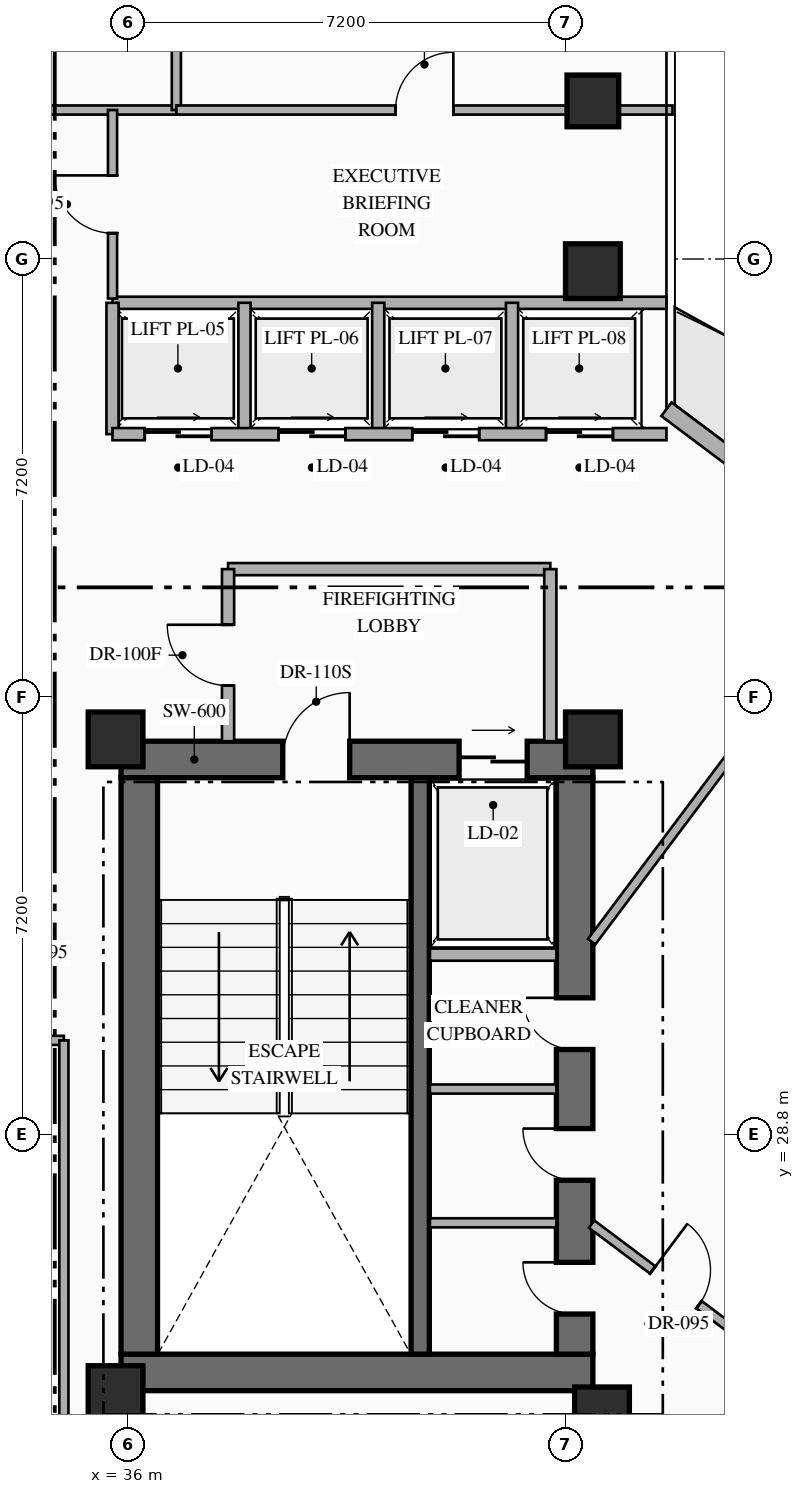
"""IFC4 building model, lengths in metres.
Left out: names, types, materials, properties, quantities, classifications, styles, units other than length and angle.
Written with IfcOpenShell. Run it as: python <this file> out.ifc"""

import sys

from ifc_helpers import new_model, si_unit, direction, frame, frame_2d, origin, origin_2d, place, context, subcontext, project, spatial, rectangle, hollow_rectangle, extrude, element, fill, save


model = new_model("IFC4")
c1 = context("Model", 3, precision=1e-05, world=origin(), true_north=direction((0.0, 1.0)))
c2 = subcontext(c1, "Body", "Model", "MODEL_VIEW")
j1 = project(units=[si_unit("LENGTHUNIT", "METRE"), si_unit("PLANEANGLEUNIT", "RADIAN")], contexts=[c1])
p1 = place(None, origin())
s1 = spatial("IfcSite", under=j1, at=p1, CompositionType="ELEMENT")
p2 = place(p1, origin())
s2 = spatial("IfcBuilding", under=s1, at=p2, CompositionType="ELEMENT")
p3 = place(p2, frame((0.0, 0.0, 160.05)))
s3 = spatial("IfcBuildingStorey", under=s2, at=p3, CompositionType="ELEMENT", Elevation=160.05)
p4 = place(p3, frame((35.89, 24.89, 0.0), z_axis=(0.0, 0.0, 1.0), x_axis=(1.0, 0.0, 0.0)))
e1 = element("IfcWall", 1, at=p4, inside=s3, PredefinedType="SHEAR", context=c2, shape_type="SweptSolid", body=[
    extrude(rectangle(XDim=7.76, YDim=0.6, at=frame_2d((3.88, 0.0))), origin(), (0.0, 0.0, 1.0), 3.6),
])
p5 = place(p3, frame((35.89, 34.97, 0.0), z_axis=(0.0, 0.0, 1.0), x_axis=(1.0, 0.0, 0.0)))
e2 = element("IfcWall", 2, at=p5, inside=s3, PredefinedType="SHEAR", context=c2, shape_type="SweptSolid", body=[
    extrude(rectangle(XDim=7.76, YDim=0.6, at=frame_2d((3.88, 0.0))), origin(), (0.0, 0.0, 1.0), 3.6),
])
p6 = place(p5, frame((2.66, 0.0, 0.0)))
e3 = element("IfcOpeningElement", 3, at=p6, cuts=e2, PredefinedType="OPENING", context=c2, shape_type="SweptSolid", body=[
    extrude(rectangle(XDim=1.1, YDim=2.2, at=frame_2d((0.55, 1.1))), frame((0.0, 0.31, 0.0), z_axis=(0.0, -1.0, 0.0), x_axis=(1.0, 0.0, 0.0)), (0.0, 0.0, 1.0), 0.62),
])
p7 = place(p5, frame((5.56, 0.0, 0.0)))
e4 = element("IfcOpeningElement", 4, at=p7, cuts=e2, PredefinedType="OPENING", context=c2, shape_type="SweptSolid", body=[
    extrude(rectangle(XDim=1.12, YDim=2.15, at=frame_2d((0.56, 1.075))), frame((0.0, 0.31, 0.0), z_axis=(0.0, -1.0, 0.0), x_axis=(1.0, 0.0, 0.0)), (0.0, 0.0, 1.0), 0.62),
])
p8 = place(p3, frame((36.19, 25.19, 0.0), z_axis=(0.0, 0.0, 1.0), x_axis=(0.0, 1.0, 0.0)))
e5 = element("IfcWall", 5, at=p8, inside=s3, PredefinedType="SHEAR", context=c2, shape_type="SweptSolid", body=[
    extrude(rectangle(XDim=9.48, YDim=0.6, at=frame_2d((4.74, 0.0))), origin(), (0.0, 0.0, 1.0), 3.6),
])
p9 = place(p3, frame((43.35, 25.19, 0.0), z_axis=(0.0, 0.0, 1.0), x_axis=(0.0, 1.0, 0.0)))
e6 = element("IfcWall", 6, at=p9, inside=s3, PredefinedType="SHEAR", context=c2, shape_type="SweptSolid", body=[
    extrude(rectangle(XDim=9.48, YDim=0.6, at=frame_2d((4.74, 0.0))), origin(), (0.0, 0.0, 1.0), 3.6),
])
p10 = place(p9, frame((0.66, 0.0, 0.0)))
e7 = element("IfcOpeningElement", 7, at=p10, cuts=e6, PredefinedType="OPENING", context=c2, shape_type="SweptSolid", body=[
    extrude(rectangle(XDim=0.85, YDim=2.08, at=frame_2d((0.425, 1.04))), frame((0.0, 0.31, 0.0), z_axis=(0.0, -1.0, 0.0), x_axis=(1.0, 0.0, 0.0)), (0.0, 0.0, 1.0), 0.62),
])
p11 = place(p9, frame((2.86, 0.0, 0.0)))
e8 = element("IfcOpeningElement", 8, at=p11, cuts=e6, PredefinedType="OPENING", context=c2, shape_type="SweptSolid", body=[
    extrude(rectangle(XDim=0.85, YDim=2.08, at=frame_2d((0.425, 1.04))), frame((0.0, 0.31, 0.0), z_axis=(0.0, -1.0, 0.0), x_axis=(1.0, 0.0, 0.0)), (0.0, 0.0, 1.0), 0.62),
])
p12 = place(p9, frame((5.01, 0.0, 0.0)))
e9 = element("IfcOpeningElement", 9, at=p12, cuts=e6, PredefinedType="OPENING", context=c2, shape_type="SweptSolid", body=[
    extrude(rectangle(XDim=0.85, YDim=2.08, at=frame_2d((0.425, 1.04))), frame((0.0, 0.31, 0.0), z_axis=(0.0, -1.0, 0.0), x_axis=(1.0, 0.0, 0.0)), (0.0, 0.0, 1.0), 0.62),
])
p13 = place(p3, frame((40.81, 25.19, 0.0), z_axis=(0.0, 0.0, 1.0), x_axis=(0.0, 1.0, 0.0)))
e10 = element("IfcWall", 10, at=p13, inside=s3, PredefinedType="SHEAR", context=c2, shape_type="SweptSolid", body=[
    extrude(rectangle(XDim=9.48, YDim=0.3, at=frame_2d((4.74, 0.0))), origin(), (0.0, 0.0, 1.0), 3.6),
])
for number, where, z_axis, x_axis in (
    (11, (35.8, 24.55, 0.0), (0.0, 0.0, 1.0), (1.0, 0.0, 0.0)),
    (12, (43.8, 24.2, 0.0), (0.0, 0.0, 1.0), (1.0, 0.0, 0.0)),
    (13, (35.8, 35.3, 0.0), (0.0, 0.0, 1.0), (1.0, 0.0, 0.0)),
    (14, (43.65, 35.3, 0.0), (0.0, 0.0, 1.0), (1.0, 0.0, 0.0)),
    (15, (43.65, 43.0, 0.0), (0.0, 0.0, 1.0), (1.0, 0.0, 0.0)),
):
    element("IfcColumn", number, at=place(p3, frame(where, z_axis=z_axis, x_axis=x_axis)), inside=s3, PredefinedType="COLUMN", context=c2, shape_type="SweptSolid", body=[
        extrude(rectangle(XDim=0.9, YDim=0.9, at=origin_2d()), origin(), (0.0, 0.0, 1.0), 3.6),
    ])
p14 = place(p3, frame((43.65, 45.8, 0.0), z_axis=(0.0, 0.0, 1.0), x_axis=(1.0, 0.0, 0.0)))
e16 = element("IfcColumn", 16, at=p14, inside=s3, PredefinedType="COLUMN", context=c2, shape_type="SweptSolid", body=[
    extrude(hollow_rectangle(XDim=0.85, YDim=0.85, WallThickness=0.032, at=origin_2d()), origin(), (0.0, 0.0, 1.0), 3.6),
])
p15 = place(p3, frame((44.86, 40.73, 0.0), z_axis=(0.0, 0.0, 1.0), x_axis=(0.800007624502, -0.599989833863, 0.0)))
e17 = element("IfcWall", 17, at=p15, inside=s3, PredefinedType="STANDARD", context=c2, shape_type="SweptSolid", body=[
    extrude(rectangle(XDim=19.212, YDim=0.28, at=frame_2d((9.606, 0.0))), origin(), (0.0, 0.0, 1.0), 3.35),
])
p16 = place(p15, frame((1.755, 0.0, 0.0)))
e18 = element("IfcOpeningElement", 18, at=p16, cuts=e17, PredefinedType="OPENING", context=c2, shape_type="SweptSolid", body=[
    extrude(rectangle(XDim=1.1, YDim=2.2, at=frame_2d((0.55, 1.1))), frame((0.0, 0.15, 0.0), z_axis=(0.0, -1.0, 0.0), x_axis=(1.0, 0.0, 0.0)), (0.0, 0.0, 1.0), 0.3),
])
p17 = place(p15, frame((13.509, 0.0, 0.85)))
e19 = element("IfcOpeningElement", 19, at=p17, cuts=e17, PredefinedType="OPENING", context=c2, shape_type="SweptSolid", body=[
    extrude(rectangle(XDim=1.8, YDim=2.1, at=frame_2d((0.9, 1.05))), frame((0.0, 0.15, 0.0), z_axis=(0.0, -1.0, 0.0), x_axis=(1.0, 0.0, 0.0)), (0.0, 0.0, 1.0), 0.3),
])
p18 = place(p3, frame((40.97, 31.76, 0.0), z_axis=(0.0, 0.0, 1.0), x_axis=(1.0, 0.0, 0.0)))
e20 = element("IfcWall", 20, at=p18, inside=s3, PredefinedType="STANDARD", context=c2, shape_type="SweptSolid", body=[
    extrude(rectangle(XDim=2.08, YDim=0.2, at=frame_2d((1.04, 0.0))), origin(), (0.0, 0.0, 1.0), 3.35),
])
for number, where, z_axis, x_axis in (
    (21, (40.97, 27.35, 0.0), (0.0, 0.0, 1.0), (1.0, 0.0, 0.0)),
    (22, (40.97, 29.55, 0.0), (0.0, 0.0, 1.0), (1.0, 0.0, 0.0)),
):
    element("IfcWall", number, at=place(p3, frame(where, z_axis=z_axis, x_axis=x_axis)), inside=s3, PredefinedType="PARTITIONING", context=c2, shape_type="SweptSolid", body=[
        extrude(rectangle(XDim=2.08, YDim=0.15, at=frame_2d((1.04, 0.0))), origin(), (0.0, 0.0, 1.0), 3.35),
    ])
p19 = place(p3, frame((37.65, 38.1, 0.0), z_axis=(0.0, 0.0, 1.0), x_axis=(1.0, 0.0, 0.0)))
e23 = element("IfcWall", 23, at=p19, inside=s3, PredefinedType="STANDARD", context=c2, shape_type="SweptSolid", body=[
    extrude(rectangle(XDim=5.3, YDim=0.2, at=frame_2d((2.65, 0.0))), origin(), (0.0, 0.0, 1.0), 3.35),
])
p20 = place(p3, frame((42.95, 35.27, 0.0), z_axis=(0.0, 0.0, 1.0), x_axis=(0.0, 1.0, 0.0)))
e24 = element("IfcWall", 24, at=p20, inside=s3, PredefinedType="STANDARD", context=c2, shape_type="SweptSolid", body=[
    extrude(rectangle(XDim=2.83, YDim=0.2, at=frame_2d((1.415, 0.0))), origin(), (0.0, 0.0, 1.0), 3.35),
])
p21 = place(p3, frame((37.65, 35.27, 0.0), z_axis=(0.0, 0.0, 1.0), x_axis=(0.0, 1.0, 0.0)))
e25 = element("IfcWall", 25, at=p21, inside=s3, PredefinedType="STANDARD", context=c2, shape_type="SweptSolid", body=[
    extrude(rectangle(XDim=2.83, YDim=0.2, at=frame_2d((1.415, 0.0))), origin(), (0.0, 0.0, 1.0), 3.35),
])
p22 = place(p21, frame((0.915, 0.0, 0.0)))
e26 = element("IfcOpeningElement", 26, at=p22, cuts=e25, PredefinedType="OPENING", context=c2, shape_type="SweptSolid", body=[
    extrude(rectangle(XDim=1.0, YDim=2.2, at=frame_2d((0.5, 1.1))), frame((0.0, 0.11, 0.0), z_axis=(0.0, -1.0, 0.0), x_axis=(1.0, 0.0, 0.0)), (0.0, 0.0, 1.0), 0.22),
])
p23 = place(p3, frame((35.75, 42.48, 0.0), z_axis=(0.0, 0.0, 1.0), x_axis=(1.0, 0.0, 0.0)))
e27 = element("IfcWall", 27, at=p23, inside=s3, PredefinedType="STANDARD", context=c2, shape_type="SweptSolid", body=[
    extrude(rectangle(XDim=9.11, YDim=0.2, at=frame_2d((4.555, 0.0))), origin(), (0.0, 0.0, 1.0), 3.35),
])
for number, where, z_axis, x_axis in (
    (28, (35.75, 40.32, 0.0), (0.0, 0.0, 1.0), (0.0, 1.0, 0.0)),
    (29, (37.92, 40.32, 0.0), (0.0, 0.0, 1.0), (0.0, 1.0, 0.0)),
    (30, (40.12, 40.32, 0.0), (0.0, 0.0, 1.0), (0.0, 1.0, 0.0)),
    (31, (42.32, 40.32, 0.0), (0.0, 0.0, 1.0), (0.0, 1.0, 0.0)),
):
    element("IfcWall", number, at=place(p3, frame(where, z_axis=z_axis, x_axis=x_axis)), inside=s3, PredefinedType="STANDARD", context=c2, shape_type="SweptSolid", body=[
        extrude(rectangle(XDim=2.16, YDim=0.2, at=frame_2d((1.08, 0.0))), origin(), (0.0, 0.0, 1.0), 3.35),
    ])
p24 = place(p3, frame((35.75, 40.32, 0.0), z_axis=(0.0, 0.0, 1.0), x_axis=(1.0, 0.0, 0.0)))
e32 = element("IfcWall", 32, at=p24, inside=s3, PredefinedType="STANDARD", context=c2, shape_type="SweptSolid", body=[
    extrude(rectangle(XDim=9.11, YDim=0.2, at=frame_2d((4.555, 0.0))), origin(), (0.0, 0.0, 1.0), 3.35),
])
p25 = place(p24, frame((0.53, 0.0, 0.0)))
e33 = element("IfcOpeningElement", 33, at=p25, cuts=e32, PredefinedType="OPENING", context=c2, shape_type="SweptSolid", body=[
    extrude(rectangle(XDim=1.1, YDim=2.18, at=frame_2d((0.55, 1.09))), frame((0.0, 0.11, 0.0), z_axis=(0.0, -1.0, 0.0), x_axis=(1.0, 0.0, 0.0)), (0.0, 0.0, 1.0), 0.22),
])
p26 = place(p24, frame((2.73, 0.0, 0.0)))
e34 = element("IfcOpeningElement", 34, at=p26, cuts=e32, PredefinedType="OPENING", context=c2, shape_type="SweptSolid", body=[
    extrude(rectangle(XDim=1.1, YDim=2.18, at=frame_2d((0.55, 1.09))), frame((0.0, 0.11, 0.0), z_axis=(0.0, -1.0, 0.0), x_axis=(1.0, 0.0, 0.0)), (0.0, 0.0, 1.0), 0.22),
])
p27 = place(p24, frame((4.93, 0.0, 0.0)))
e35 = element("IfcOpeningElement", 35, at=p27, cuts=e32, PredefinedType="OPENING", context=c2, shape_type="SweptSolid", body=[
    extrude(rectangle(XDim=1.1, YDim=2.18, at=frame_2d((0.55, 1.09))), frame((0.0, 0.11, 0.0), z_axis=(0.0, -1.0, 0.0), x_axis=(1.0, 0.0, 0.0)), (0.0, 0.0, 1.0), 0.22),
])
p28 = place(p24, frame((7.13, 0.0, 0.0)))
e36 = element("IfcOpeningElement", 36, at=p28, cuts=e32, PredefinedType="OPENING", context=c2, shape_type="SweptSolid", body=[
    extrude(rectangle(XDim=1.1, YDim=2.18, at=frame_2d((0.55, 1.09))), frame((0.0, 0.11, 0.0), z_axis=(0.0, -1.0, 0.0), x_axis=(1.0, 0.0, 0.0)), (0.0, 0.0, 1.0), 0.22),
])
p29 = place(p3, frame((30.5, 30.35, 0.0), z_axis=(0.0, 0.0, 1.0), x_axis=(1.0, 0.0, 0.0)))
e37 = element("IfcWall", 37, at=p29, inside=s3, PredefinedType="PARTITIONING", context=c2, shape_type="SweptSolid", body=[
    extrude(rectangle(XDim=4.45, YDim=0.15, at=frame_2d((2.225, 0.0))), origin(), (0.0, 0.0, 1.0), 3.35),
])
p30 = place(p29, frame((2.846, 0.0, 0.0)))
e38 = element("IfcOpeningElement", 38, at=p30, cuts=e37, PredefinedType="OPENING", context=c2, shape_type="SweptSolid", body=[
    extrude(rectangle(XDim=0.95, YDim=2.15, at=frame_2d((0.475, 1.075))), frame((0.0, 0.085, 0.0), z_axis=(0.0, -1.0, 0.0), x_axis=(1.0, 0.0, 0.0)), (0.0, 0.0, 1.0), 0.17),
])
p31 = place(p3, frame((34.95, 23.2, 0.0), z_axis=(0.0, 0.0, 1.0), x_axis=(0.0, 1.0, 0.0)))
e39 = element("IfcWall", 39, at=p31, inside=s3, PredefinedType="PARTITIONING", context=c2, shape_type="SweptSolid", body=[
    extrude(rectangle(XDim=7.15, YDim=0.15, at=frame_2d((3.575, 0.0))), origin(), (0.0, 0.0, 1.0), 3.35),
])
p32 = place(p3, frame((28.4, 45.65, 0.0), z_axis=(0.0, 0.0, 1.0), x_axis=(1.0, 0.0, 0.0)))
e40 = element("IfcWall", 40, at=p32, inside=s3, PredefinedType="PARTITIONING", context=c2, shape_type="SweptSolid", body=[
    extrude(rectangle(XDim=8.4, YDim=0.15, at=frame_2d((4.2, 0.0))), origin(), (0.0, 0.0, 1.0), 2.695),
])
p33 = place(p32, frame((2.052, 0.0, 0.0)))
e41 = element("IfcOpeningElement", 41, at=p33, cuts=e40, PredefinedType="OPENING", context=c2, shape_type="SweptSolid", body=[
    extrude(rectangle(XDim=0.95, YDim=2.15, at=frame_2d((0.475, 1.075))), frame((0.0, 0.085, 0.0), z_axis=(0.0, -1.0, 0.0), x_axis=(1.0, 0.0, 0.0)), (0.0, 0.0, 1.0), 0.17),
])
p34 = place(p3, frame((36.8, 45.65, 0.0), z_axis=(0.0, 0.0, 1.0), x_axis=(0.0, 1.0, 0.0)))
e42 = element("IfcWall", 42, at=p34, inside=s3, PredefinedType="PARTITIONING", context=c2, shape_type="SweptSolid", body=[
    extrude(rectangle(XDim=4.71, YDim=0.15, at=frame_2d((2.355, 0.0))), origin(), (0.0, 0.0, 1.0), 3.35),
])
p35 = place(p3, frame((36.8, 45.65, 0.0), z_axis=(0.0, 0.0, 1.0), x_axis=(1.0, 0.0, 0.0)))
e43 = element("IfcWall", 43, at=p35, inside=s3, PredefinedType="PARTITIONING", context=c2, shape_type="SweptSolid", body=[
    extrude(rectangle(XDim=8.16, YDim=0.15, at=frame_2d((4.08, 0.0))), origin(), (0.0, 0.0, 1.0), 2.695),
])
p36 = place(p35, frame((3.605, 0.0, 0.0)))
e44 = element("IfcOpeningElement", 44, at=p36, cuts=e43, PredefinedType="OPENING", context=c2, shape_type="SweptSolid", body=[
    extrude(rectangle(XDim=0.95, YDim=2.15, at=frame_2d((0.475, 1.075))), frame((0.0, 0.085, 0.0), z_axis=(0.0, -1.0, 0.0), x_axis=(1.0, 0.0, 0.0)), (0.0, 0.0, 1.0), 0.17),
])
p37 = place(p3, frame((45.32, 22.56, 0.0), z_axis=(0.0, 0.0, 1.0), x_axis=(0.6, 0.8, 0.0)))
e45 = element("IfcWall", 45, at=p37, inside=s3, PredefinedType="PARTITIONING", context=c2, shape_type="SweptSolid", body=[
    extrude(rectangle(XDim=7.4, YDim=0.15, at=frame_2d((3.7, 0.0))), origin(), (0.0, 0.0, 1.0), 3.35),
])
p38 = place(p37, frame((3.51, 0.0, 0.0)))
e46 = element("IfcOpeningElement", 46, at=p38, cuts=e45, PredefinedType="OPENING", context=c2, shape_type="SweptSolid", body=[
    extrude(rectangle(XDim=0.95, YDim=2.15, at=frame_2d((0.475, 1.075))), frame((0.0, 0.085, 0.0), z_axis=(0.0, -1.0, 0.0), x_axis=(1.0, 0.0, 0.0)), (0.0, 0.0, 1.0), 0.17),
])
p39 = place(p3, frame((43.63, 27.328, 0.0), z_axis=(0.0, 0.0, 1.0), x_axis=(0.799972182084, -0.600037088764, 0.0)))
e47 = element("IfcWall", 47, at=p39, inside=s3, PredefinedType="PARTITIONING", context=c2, shape_type="SweptSolid", body=[
    extrude(rectangle(XDim=4.213, YDim=0.15, at=frame_2d((2.106, 0.0))), origin(), (0.0, 0.0, 1.0), 3.045),
])
p40 = place(p39, frame((1.256, 0.0, 0.0)))
e48 = element("IfcOpeningElement", 48, at=p40, cuts=e47, PredefinedType="OPENING", context=c2, shape_type="SweptSolid", body=[
    extrude(rectangle(XDim=0.95, YDim=2.15, at=frame_2d((0.475, 1.075))), frame((0.0, 0.085, 0.0), z_axis=(0.0, -1.0, 0.0), x_axis=(1.0, 0.0, 0.0)), (0.0, 0.0, 1.0), 0.17),
])
p41 = place(p3, frame((43.63, 31.973, 0.0), z_axis=(0.0, 0.0, 1.0), x_axis=(0.599975099311, 0.800018674911, 0.0)))
e49 = element("IfcWall", 49, at=p41, inside=s3, PredefinedType="PARTITIONING", context=c2, shape_type="SweptSolid", body=[
    extrude(rectangle(XDim=7.844, YDim=0.15, at=frame_2d((3.922, 0.0))), origin(), (0.0, 0.0, 1.0), 3.35),
])
p42 = place(p3, frame((35.75, 42.55, 0.0), z_axis=(0.0, 0.0, 1.0), x_axis=(0.0, 1.0, 0.0)))
e50 = element("IfcWall", 50, at=p42, inside=s3, PredefinedType="PARTITIONING", context=c2, shape_type="SweptSolid", body=[
    extrude(rectangle(XDim=3.1, YDim=0.15, at=frame_2d((1.55, 0.0))), origin(), (0.0, 0.0, 1.0), 3.35),
])
p43 = place(p42, frame((1.075, 0.0, 0.0)))
e51 = element("IfcOpeningElement", 51, at=p43, cuts=e50, PredefinedType="OPENING", context=c2, shape_type="SweptSolid", body=[
    extrude(rectangle(XDim=0.95, YDim=2.15, at=frame_2d((0.475, 1.075))), frame((0.0, 0.085, 0.0), z_axis=(0.0, -1.0, 0.0), x_axis=(1.0, 0.0, 0.0)), (0.0, 0.0, 1.0), 0.17),
])
p44 = place(p3, frame((27.91, 26.68, 0.0), z_axis=(0.0, 0.0, 1.0), x_axis=(0.800005938517, -0.599992081896, 0.0)))
e52 = element("IfcWall", 52, at=p44, inside=s3, PredefinedType="PARTITIONING", context=c2, shape_type="SweptSolid", body=[
    extrude(rectangle(XDim=14.8, YDim=0.15, at=frame_2d((7.4, 0.0))), origin(), (0.0, 0.0, 1.0), 3.35),
])
p45 = place(p44, frame((9.281, 0.0, 0.0)))
e53 = element("IfcOpeningElement", 53, at=p45, cuts=e52, PredefinedType="OPENING", context=c2, shape_type="SweptSolid", body=[
    extrude(rectangle(XDim=0.95, YDim=2.15, at=frame_2d((0.475, 1.075))), frame((0.0, 0.085, 0.0), z_axis=(0.0, -1.0, 0.0), x_axis=(1.0, 0.0, 0.0)), (0.0, 0.0, 1.0), 0.17),
])
p46 = place(p6, origin())
e54 = element("IfcDoor", 54, at=p46, inside=s3, OperationType="SINGLE_SWING_RIGHT", PredefinedType="DOOR", context=c2, shape_type="SweptSolid", body=[
    extrude(rectangle(XDim=1.1, YDim=2.2, at=frame_2d((0.55, 1.1))), frame((0.0, 0.025, 0.0), z_axis=(0.0, -1.0, 0.0), x_axis=(1.0, 0.0, 0.0)), (0.0, 0.0, 1.0), 0.05),
])
fill(e3, e54)
p47 = place(p7, origin())
e55 = element("IfcDoor", 55, at=p47, inside=s3, OperationType="SLIDING_TO_RIGHT", PredefinedType="USERDEFINED", context=c2, shape_type="SweptSolid", body=[
    extrude(rectangle(XDim=1.12, YDim=2.15, at=frame_2d((0.56, 1.075))), frame((0.0, 0.025, 0.0), z_axis=(0.0, -1.0, 0.0), x_axis=(1.0, 0.0, 0.0)), (0.0, 0.0, 1.0), 0.05),
])
fill(e4, e55)
p48 = place(p10, origin())
e56 = element("IfcDoor", 56, at=p48, inside=s3, OperationType="SINGLE_SWING_RIGHT", PredefinedType="DOOR", context=c2, shape_type="SweptSolid", body=[
    extrude(rectangle(XDim=0.85, YDim=2.08, at=frame_2d((0.425, 1.04))), frame((0.0, 0.025, 0.0), z_axis=(0.0, -1.0, 0.0), x_axis=(1.0, 0.0, 0.0)), (0.0, 0.0, 1.0), 0.05),
])
fill(e7, e56)
p49 = place(p11, origin())
e57 = element("IfcDoor", 57, at=p49, inside=s3, OperationType="SINGLE_SWING_RIGHT", PredefinedType="DOOR", context=c2, shape_type="SweptSolid", body=[
    extrude(rectangle(XDim=0.85, YDim=2.08, at=frame_2d((0.425, 1.04))), frame((0.0, 0.025, 0.0), z_axis=(0.0, -1.0, 0.0), x_axis=(1.0, 0.0, 0.0)), (0.0, 0.0, 1.0), 0.05),
])
fill(e8, e57)
p50 = place(p12, origin())
e58 = element("IfcDoor", 58, at=p50, inside=s3, OperationType="SINGLE_SWING_RIGHT", PredefinedType="DOOR", context=c2, shape_type="SweptSolid", body=[
    extrude(rectangle(XDim=0.85, YDim=2.08, at=frame_2d((0.425, 1.04))), frame((0.0, 0.025, 0.0), z_axis=(0.0, -1.0, 0.0), x_axis=(1.0, 0.0, 0.0)), (0.0, 0.0, 1.0), 0.05),
])
fill(e9, e58)
p51 = place(p22, origin())
e59 = element("IfcDoor", 59, at=p51, inside=s3, OperationType="SINGLE_SWING_RIGHT", PredefinedType="DOOR", context=c2, shape_type="SweptSolid", body=[
    extrude(rectangle(XDim=1.0, YDim=2.2, at=frame_2d((0.5, 1.1))), frame((0.0, 0.025, 0.0), z_axis=(0.0, -1.0, 0.0), x_axis=(1.0, 0.0, 0.0)), (0.0, 0.0, 1.0), 0.05),
])
fill(e26, e59)
p52 = place(p25, origin())
e60 = element("IfcDoor", 60, at=p52, inside=s3, OperationType="SLIDING_TO_RIGHT", PredefinedType="USERDEFINED", context=c2, shape_type="SweptSolid", body=[
    extrude(rectangle(XDim=1.1, YDim=2.18, at=frame_2d((0.55, 1.09))), frame((0.0, 0.025, 0.0), z_axis=(0.0, -1.0, 0.0), x_axis=(1.0, 0.0, 0.0)), (0.0, 0.0, 1.0), 0.05),
])
fill(e33, e60)
p53 = place(p26, origin())
e61 = element("IfcDoor", 61, at=p53, inside=s3, OperationType="SLIDING_TO_RIGHT", PredefinedType="USERDEFINED", context=c2, shape_type="SweptSolid", body=[
    extrude(rectangle(XDim=1.1, YDim=2.18, at=frame_2d((0.55, 1.09))), frame((0.0, 0.025, 0.0), z_axis=(0.0, -1.0, 0.0), x_axis=(1.0, 0.0, 0.0)), (0.0, 0.0, 1.0), 0.05),
])
fill(e34, e61)
p54 = place(p27, origin())
e62 = element("IfcDoor", 62, at=p54, inside=s3, OperationType="SLIDING_TO_RIGHT", PredefinedType="USERDEFINED", context=c2, shape_type="SweptSolid", body=[
    extrude(rectangle(XDim=1.1, YDim=2.18, at=frame_2d((0.55, 1.09))), frame((0.0, 0.025, 0.0), z_axis=(0.0, -1.0, 0.0), x_axis=(1.0, 0.0, 0.0)), (0.0, 0.0, 1.0), 0.05),
])
fill(e35, e62)
p55 = place(p28, origin())
e63 = element("IfcDoor", 63, at=p55, inside=s3, OperationType="SLIDING_TO_RIGHT", PredefinedType="USERDEFINED", context=c2, shape_type="SweptSolid", body=[
    extrude(rectangle(XDim=1.1, YDim=2.18, at=frame_2d((0.55, 1.09))), frame((0.0, 0.025, 0.0), z_axis=(0.0, -1.0, 0.0), x_axis=(1.0, 0.0, 0.0)), (0.0, 0.0, 1.0), 0.05),
])
fill(e36, e63)
p56 = place(p36, origin())
e64 = element("IfcDoor", 64, at=p56, inside=s3, OperationType="SINGLE_SWING_RIGHT", PredefinedType="DOOR", context=c2, shape_type="SweptSolid", body=[
    extrude(rectangle(XDim=0.95, YDim=2.15, at=frame_2d((0.475, 1.075))), frame((0.0, 0.025, 0.0), z_axis=(0.0, -1.0, 0.0), x_axis=(1.0, 0.0, 0.0)), (0.0, 0.0, 1.0), 0.05),
])
fill(e44, e64)
p57 = place(p40, origin())
e65 = element("IfcDoor", 65, at=p57, inside=s3, OperationType="SINGLE_SWING_LEFT", PredefinedType="DOOR", context=c2, shape_type="SweptSolid", body=[
    extrude(rectangle(XDim=0.95, YDim=2.15, at=frame_2d((0.475, 1.075))), frame((0.0, 0.025, 0.0), z_axis=(0.0, -1.0, 0.0), x_axis=(1.0, 0.0, 0.0)), (0.0, 0.0, 1.0), 0.05),
])
fill(e48, e65)
p58 = place(p43, origin())
e66 = element("IfcDoor", 66, at=p58, inside=s3, OperationType="SINGLE_SWING_RIGHT", PredefinedType="DOOR", context=c2, shape_type="SweptSolid", body=[
    extrude(rectangle(XDim=0.95, YDim=2.15, at=frame_2d((0.475, 1.075))), frame((0.0, 0.025, 0.0), z_axis=(0.0, -1.0, 0.0), x_axis=(1.0, 0.0, 0.0)), (0.0, 0.0, 1.0), 0.05),
])
fill(e51, e66)
save(model, sys.argv[1])
